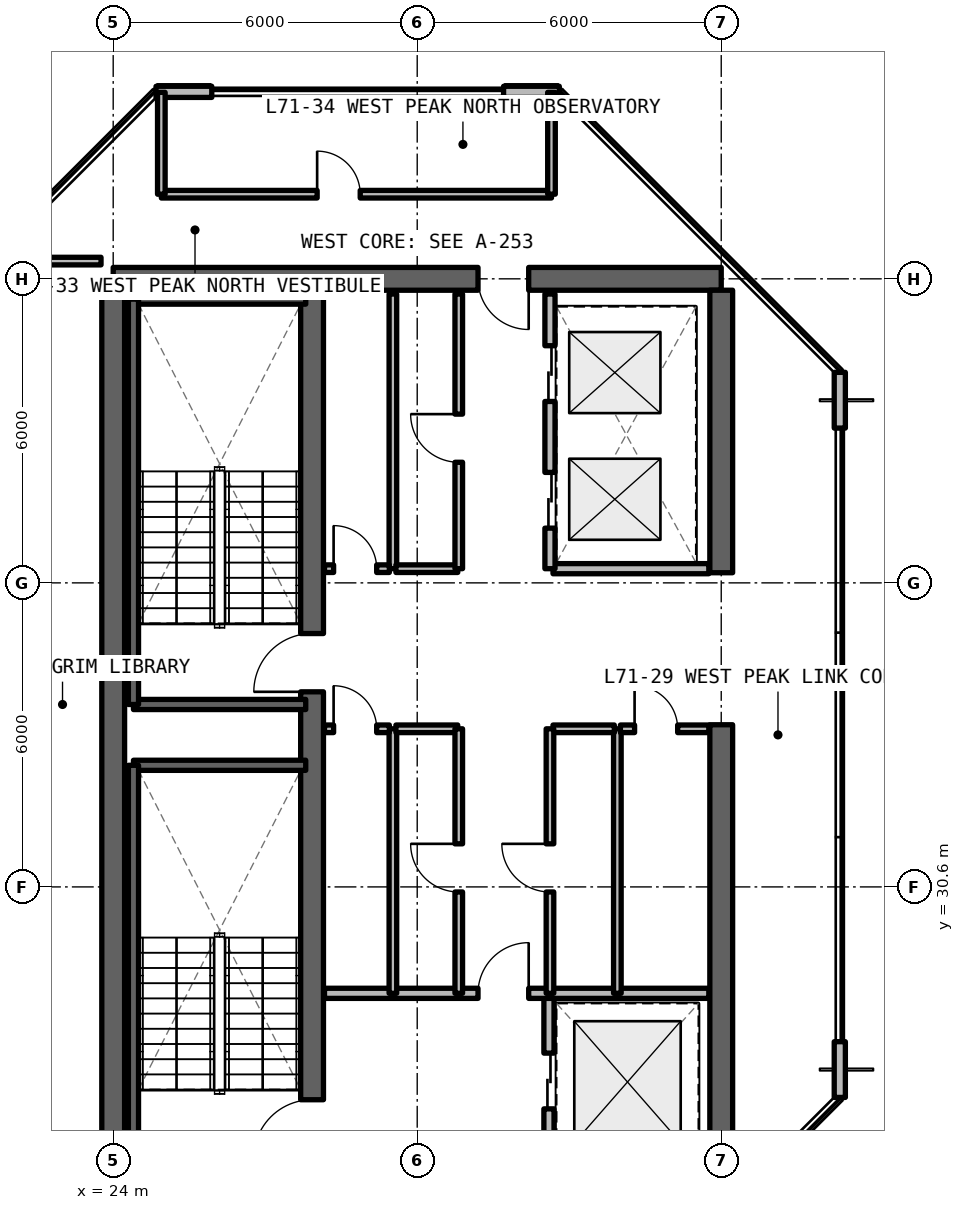
"""IFC4 building model, lengths in metres.
Left out: names, types, materials, properties, quantities, classifications, styles, units other than length and angle.
Written with IfcOpenShell. Run it as: python <this file> out.ifc"""

import sys

from ifc_helpers import new_model, si_unit, direction, frame, frame_2d, origin, place, context, subcontext, project, spatial, rectangle, extrude, element, fill, save


model = new_model("IFC4")
c1 = context("Model", 3, precision=1e-05, world=origin(), true_north=direction((0.0, 1.0)))
c2 = subcontext(c1, "Body", "Model", "MODEL_VIEW")
j1 = project(units=[si_unit("LENGTHUNIT", "METRE"), si_unit("PLANEANGLEUNIT", "RADIAN")], contexts=[c1])
p1 = place(None, origin())
s1 = spatial("IfcSite", under=j1, at=p1, CompositionType="ELEMENT")
p2 = place(p1, origin())
s2 = spatial("IfcBuilding", under=s1, at=p2, CompositionType="ELEMENT")
p3 = place(p2, frame((0.0, 0.0, 253.44)))
s3 = spatial("IfcBuildingStorey", under=s2, at=p3, CompositionType="ELEMENT", Elevation=253.44)
p4 = place(p3, frame((36.0, 42.6, 0.0), z_axis=(0.0, 0.0, 1.0), x_axis=(-1.0, 0.0, 0.0)))
e1 = element("IfcWall", 1, at=p4, inside=s3, PredefinedType="SHEAR", context=c2, shape_type="SweptSolid", body=[
    extrude(rectangle(XDim=12.0, YDim=0.45, at=frame_2d((6.0, 0.0))), origin(), (0.0, 0.0, 1.0), 3.63),
])
p5 = place(p4, frame((3.8, 0.0, 0.0)))
e2 = element("IfcOpeningElement", 2, at=p5, cuts=e1, PredefinedType="OPENING", context=c2, shape_type="SweptSolid", body=[
    extrude(rectangle(XDim=1.0, YDim=2.15, at=frame_2d((0.5, 1.075))), frame((0.0, 0.235, 0.0), z_axis=(0.0, -1.0, 0.0), x_axis=(1.0, 0.0, 0.0)), (0.0, 0.0, 1.0), 0.47),
])
p6 = place(p3, frame((24.0, 24.825, 0.0), z_axis=(0.0, 0.0, 1.0), x_axis=(0.0, 1.0, 0.0)))
e3 = element("IfcWall", 3, at=p6, inside=s3, PredefinedType="SHEAR", context=c2, shape_type="SweptSolid", body=[
    extrude(rectangle(XDim=17.55, YDim=0.45, at=frame_2d((8.775, 0.0))), origin(), (0.0, 0.0, 1.0), 3.63),
])
p7 = place(p3, frame((36.0, 24.825, 0.0), z_axis=(0.0, 0.0, 1.0), x_axis=(0.0, 1.0, 0.0)))
e4 = element("IfcWall", 4, at=p7, inside=s3, PredefinedType="SHEAR", context=c2, shape_type="SweptSolid", body=[
    extrude(rectangle(XDim=8.975, YDim=0.45, at=frame_2d((4.488, 0.0))), origin(), (0.0, 0.0, 1.0), 3.63),
])
p8 = place(p3, frame((36.0, 36.8, 0.0), z_axis=(0.0, 0.0, 1.0), x_axis=(0.0, 1.0, 0.0)))
e5 = element("IfcWall", 5, at=p8, inside=s3, PredefinedType="SHEAR", context=c2, shape_type="SweptSolid", body=[
    extrude(rectangle(XDim=5.575, YDim=0.45, at=frame_2d((2.788, 0.0))), origin(), (0.0, 0.0, 1.0), 3.63),
])
p9 = place(p3, frame((27.925, 24.825, 0.0), z_axis=(0.0, 0.0, 1.0), x_axis=(0.0, 1.0, 0.0)))
e6 = element("IfcWall", 6, at=p9, inside=s3, PredefinedType="SHEAR", context=c2, shape_type="SweptSolid", body=[
    extrude(rectangle(XDim=17.55, YDim=0.45, at=frame_2d((8.775, 0.0))), origin(), (0.0, 0.0, 1.0), 3.63),
])
p10 = place(p9, frame((0.425, 0.0, 0.0)))
e7 = element("IfcOpeningElement", 7, at=p10, cuts=e6, PredefinedType="OPENING", context=c2, shape_type="SweptSolid", body=[
    extrude(rectangle(XDim=1.15, YDim=2.15, at=frame_2d((0.575, 1.075))), frame((0.0, 0.235, 0.0), z_axis=(0.0, -1.0, 0.0), x_axis=(1.0, 0.0, 0.0)), (0.0, 0.0, 1.0), 0.47),
])
p11 = place(p9, frame((9.625, 0.0, 0.0)))
e8 = element("IfcOpeningElement", 8, at=p11, cuts=e6, PredefinedType="OPENING", context=c2, shape_type="SweptSolid", body=[
    extrude(rectangle(XDim=1.15, YDim=2.15, at=frame_2d((0.575, 1.075))), frame((0.0, 0.235, 0.0), z_axis=(0.0, -1.0, 0.0), x_axis=(1.0, 0.0, 0.0)), (0.0, 0.0, 1.0), 0.47),
])
for number, where, z_axis, x_axis in (
    (9, (38.34, 26.446, 0.0), (0.0, 0.0, 1.0), (0.0, 1.0, 0.0)),
    (10, (38.34, 39.654, 0.0), (0.0, 0.0, 1.0), (0.0, 1.0, 0.0)),
    (11, (32.804, 46.29, 0.0), (0.0, 0.0, 1.0), (-1.0, 0.0, 0.0)),
):
    element("IfcWall", number, at=place(p3, frame(where, z_axis=z_axis, x_axis=x_axis)), inside=s3, PredefinedType="SOLIDWALL", context=c2, shape_type="SweptSolid", body=[
        extrude(rectangle(XDim=1.1, YDim=0.22, at=frame_2d((0.55, 0.0))), origin(), (0.0, 0.0, 1.0), 3.41),
    ])
p12 = place(p3, frame((25.946, 46.29, 0.0), z_axis=(0.0, 0.0, 1.0), x_axis=(-1.0, 0.0, 0.0)))
e12 = element("IfcWall", 12, at=p12, inside=s3, PredefinedType="SOLIDWALL", context=c2, shape_type="SweptSolid", body=[
    extrude(rectangle(XDim=1.1, YDim=0.22, at=frame_2d((0.55, 0.0))), origin(), (0.0, 0.0, 1.0), 3.41),
])
p13 = place(p3, frame((32.6, 24.92, 0.0), z_axis=(0.0, 0.0, 1.0), x_axis=(0.0, 1.0, 0.0)))
e13 = element("IfcWall", 13, at=p13, inside=s3, PredefinedType="SOLIDWALL", context=c2, shape_type="SweptSolid", body=[
    extrude(rectangle(XDim=3.58, YDim=0.2, at=frame_2d((1.79, 0.0))), origin(), (0.0, 0.0, 1.0), 2.63),
])
p14 = place(p13, frame((1.3, 0.0, 0.0)))
e14 = element("IfcOpeningElement", 14, at=p14, cuts=e13, PredefinedType="OPENING", context=c2, shape_type="SweptSolid", body=[
    extrude(rectangle(XDim=1.1, YDim=2.2, at=frame_2d((0.55, 1.1))), frame((0.0, 0.11, 0.0), z_axis=(0.0, -1.0, 0.0), x_axis=(1.0, 0.0, 0.0)), (0.0, 0.0, 1.0), 0.22),
])
p15 = place(p3, frame((28.17, 28.5, 0.0), z_axis=(0.0, 0.0, 1.0), x_axis=(1.0, 0.0, 0.0)))
e15 = element("IfcWall", 15, at=p15, inside=s3, PredefinedType="SOLIDWALL", context=c2, shape_type="SweptSolid", body=[
    extrude(rectangle(XDim=7.585, YDim=0.2, at=frame_2d((3.792, 0.0))), origin(), (0.0, 0.0, 1.0), 2.63),
])
p16 = place(p15, frame((3.03, 0.0, 0.0)))
e16 = element("IfcOpeningElement", 16, at=p16, cuts=e15, PredefinedType="OPENING", context=c2, shape_type="SweptSolid", body=[
    extrude(rectangle(XDim=1.0, YDim=2.15, at=frame_2d((0.5, 1.075))), frame((0.0, 0.11, 0.0), z_axis=(0.0, -1.0, 0.0), x_axis=(1.0, 0.0, 0.0)), (0.0, 0.0, 1.0), 0.22),
])
p17 = place(p3, frame((29.52, 28.5, 0.0), z_axis=(0.0, 0.0, 1.0), x_axis=(0.0, 1.0, 0.0)))
e17 = element("IfcWall", 17, at=p17, inside=s3, PredefinedType="SOLIDWALL", context=c2, shape_type="SweptSolid", body=[
    extrude(rectangle(XDim=5.22, YDim=0.15, at=frame_2d((2.61, 0.0))), origin(), (0.0, 0.0, 1.0), 2.63),
])
p18 = place(p3, frame((28.17, 33.72, 0.0), z_axis=(0.0, 0.0, 1.0), x_axis=(1.0, 0.0, 0.0)))
e18 = element("IfcWall", 18, at=p18, inside=s3, PredefinedType="SOLIDWALL", context=c2, shape_type="SweptSolid", body=[
    extrude(rectangle(XDim=1.28, YDim=0.15, at=frame_2d((0.64, 0.0))), origin(), (0.0, 0.0, 1.0), 2.63),
])
p19 = place(p18, frame((0.18, 0.0, 0.0)))
e19 = element("IfcOpeningElement", 19, at=p19, cuts=e18, PredefinedType="OPENING", context=c2, shape_type="SweptSolid", body=[
    extrude(rectangle(XDim=0.85, YDim=2.1, at=frame_2d((0.425, 1.05))), frame((0.0, 0.085, 0.0), z_axis=(0.0, -1.0, 0.0), x_axis=(1.0, 0.0, 0.0)), (0.0, 0.0, 1.0), 0.17),
])
p20 = place(p3, frame((29.58, 33.72, 0.0), z_axis=(0.0, 0.0, 1.0), x_axis=(1.0, 0.0, 0.0)))
e20 = element("IfcWall", 20, at=p20, inside=s3, PredefinedType="SOLIDWALL", context=c2, shape_type="SweptSolid", body=[
    extrude(rectangle(XDim=1.22, YDim=0.15, at=frame_2d((0.61, 0.0))), origin(), (0.0, 0.0, 1.0), 2.63),
])
p21 = place(p3, frame((30.82, 28.5, 0.0), z_axis=(0.0, 0.0, 1.0), x_axis=(0.0, 1.0, 0.0)))
e21 = element("IfcWall", 21, at=p21, inside=s3, PredefinedType="SOLIDWALL", context=c2, shape_type="SweptSolid", body=[
    extrude(rectangle(XDim=5.22, YDim=0.15, at=frame_2d((2.61, 0.0))), origin(), (0.0, 0.0, 1.0), 2.63),
])
p22 = place(p21, frame((2.0, 0.0, 0.0)))
e22 = element("IfcOpeningElement", 22, at=p22, cuts=e21, PredefinedType="OPENING", context=c2, shape_type="SweptSolid", body=[
    extrude(rectangle(XDim=0.95, YDim=2.15, at=frame_2d((0.475, 1.075))), frame((0.0, 0.085, 0.0), z_axis=(0.0, -1.0, 0.0), x_axis=(1.0, 0.0, 0.0)), (0.0, 0.0, 1.0), 0.17),
])
p23 = place(p3, frame((33.95, 28.5, 0.0), z_axis=(0.0, 0.0, 1.0), x_axis=(0.0, 1.0, 0.0)))
e23 = element("IfcWall", 23, at=p23, inside=s3, PredefinedType="SOLIDWALL", context=c2, shape_type="SweptSolid", body=[
    extrude(rectangle(XDim=5.22, YDim=0.15, at=frame_2d((2.61, 0.0))), origin(), (0.0, 0.0, 1.0), 2.63),
])
p24 = place(p3, frame((32.68, 33.72, 0.0), z_axis=(0.0, 0.0, 1.0), x_axis=(1.0, 0.0, 0.0)))
e24 = element("IfcWall", 24, at=p24, inside=s3, PredefinedType="SOLIDWALL", context=c2, shape_type="SweptSolid", body=[
    extrude(rectangle(XDim=1.21, YDim=0.15, at=frame_2d((0.605, 0.0))), origin(), (0.0, 0.0, 1.0), 2.63),
])
p25 = place(p3, frame((34.01, 33.72, 0.0), z_axis=(0.0, 0.0, 1.0), x_axis=(1.0, 0.0, 0.0)))
e25 = element("IfcWall", 25, at=p25, inside=s3, PredefinedType="SOLIDWALL", context=c2, shape_type="SweptSolid", body=[
    extrude(rectangle(XDim=1.745, YDim=0.15, at=frame_2d((0.873, 0.0))), origin(), (0.0, 0.0, 1.0), 2.63),
])
p26 = place(p25, frame((0.28, 0.0, 0.0)))
e26 = element("IfcOpeningElement", 26, at=p26, cuts=e25, PredefinedType="OPENING", context=c2, shape_type="SweptSolid", body=[
    extrude(rectangle(XDim=0.85, YDim=2.1, at=frame_2d((0.425, 1.05))), frame((0.0, 0.085, 0.0), z_axis=(0.0, -1.0, 0.0), x_axis=(1.0, 0.0, 0.0)), (0.0, 0.0, 1.0), 0.17),
])
p27 = place(p3, frame((32.62, 28.5, 0.0), z_axis=(0.0, 0.0, 1.0), x_axis=(0.0, 1.0, 0.0)))
e27 = element("IfcWall", 27, at=p27, inside=s3, PredefinedType="SOLIDWALL", context=c2, shape_type="SweptSolid", body=[
    extrude(rectangle(XDim=5.22, YDim=0.15, at=frame_2d((2.61, 0.0))), origin(), (0.0, 0.0, 1.0), 2.63),
])
p28 = place(p27, frame((2.0, 0.0, 0.0)))
e28 = element("IfcOpeningElement", 28, at=p28, cuts=e27, PredefinedType="OPENING", context=c2, shape_type="SweptSolid", body=[
    extrude(rectangle(XDim=0.95, YDim=2.15, at=frame_2d((0.475, 1.075))), frame((0.0, 0.085, 0.0), z_axis=(0.0, -1.0, 0.0), x_axis=(1.0, 0.0, 0.0)), (0.0, 0.0, 1.0), 0.17),
])
p29 = place(p3, frame((29.52, 36.88, 0.0), z_axis=(0.0, 0.0, 1.0), x_axis=(0.0, 1.0, 0.0)))
e29 = element("IfcWall", 29, at=p29, inside=s3, PredefinedType="SOLIDWALL", context=c2, shape_type="SweptSolid", body=[
    extrude(rectangle(XDim=5.42, YDim=0.15, at=frame_2d((2.71, 0.0))), origin(), (0.0, 0.0, 1.0), 2.63),
])
p30 = place(p3, frame((28.17, 36.88, 0.0), z_axis=(0.0, 0.0, 1.0), x_axis=(1.0, 0.0, 0.0)))
e30 = element("IfcWall", 30, at=p30, inside=s3, PredefinedType="SOLIDWALL", context=c2, shape_type="SweptSolid", body=[
    extrude(rectangle(XDim=1.28, YDim=0.15, at=frame_2d((0.64, 0.0))), origin(), (0.0, 0.0, 1.0), 2.63),
])
p31 = place(p30, frame((0.18, 0.0, 0.0)))
e31 = element("IfcOpeningElement", 31, at=p31, cuts=e30, PredefinedType="OPENING", context=c2, shape_type="SweptSolid", body=[
    extrude(rectangle(XDim=0.85, YDim=2.1, at=frame_2d((0.425, 1.05))), frame((0.0, 0.085, 0.0), z_axis=(0.0, -1.0, 0.0), x_axis=(1.0, 0.0, 0.0)), (0.0, 0.0, 1.0), 0.17),
])
p32 = place(p3, frame((29.58, 36.88, 0.0), z_axis=(0.0, 0.0, 1.0), x_axis=(1.0, 0.0, 0.0)))
e32 = element("IfcWall", 32, at=p32, inside=s3, PredefinedType="SOLIDWALL", context=c2, shape_type="SweptSolid", body=[
    extrude(rectangle(XDim=1.22, YDim=0.15, at=frame_2d((0.61, 0.0))), origin(), (0.0, 0.0, 1.0), 2.63),
])
p33 = place(p3, frame((30.82, 36.88, 0.0), z_axis=(0.0, 0.0, 1.0), x_axis=(0.0, 1.0, 0.0)))
e33 = element("IfcWall", 33, at=p33, inside=s3, PredefinedType="SOLIDWALL", context=c2, shape_type="SweptSolid", body=[
    extrude(rectangle(XDim=5.42, YDim=0.15, at=frame_2d((2.71, 0.0))), origin(), (0.0, 0.0, 1.0), 2.63),
])
p34 = place(p33, frame((2.1, 0.0, 0.0)))
e34 = element("IfcOpeningElement", 34, at=p34, cuts=e33, PredefinedType="OPENING", context=c2, shape_type="SweptSolid", body=[
    extrude(rectangle(XDim=0.95, YDim=2.15, at=frame_2d((0.475, 1.075))), frame((0.0, 0.085, 0.0), z_axis=(0.0, -1.0, 0.0), x_axis=(1.0, 0.0, 0.0)), (0.0, 0.0, 1.0), 0.17),
])
p35 = place(p3, frame((32.68, 36.88, 0.0), z_axis=(0.0, 0.0, 1.0), x_axis=(1.0, 0.0, 0.0)))
e35 = element("IfcWall", 35, at=p35, inside=s3, PredefinedType="SOLIDWALL", context=c2, shape_type="SweptSolid", body=[
    extrude(rectangle(XDim=3.075, YDim=0.2, at=frame_2d((1.538, 0.0))), origin(), (0.0, 0.0, 1.0), 2.63),
])
p36 = place(p3, frame((32.62, 36.88, 0.0), z_axis=(0.0, 0.0, 1.0), x_axis=(0.0, 1.0, 0.0)))
e36 = element("IfcWall", 36, at=p36, inside=s3, PredefinedType="SOLIDWALL", context=c2, shape_type="SweptSolid", body=[
    extrude(rectangle(XDim=5.42, YDim=0.2, at=frame_2d((2.71, 0.0))), origin(), (0.0, 0.0, 1.0), 2.63),
])
p37 = place(p36, frame((0.8, 0.0, 0.0)))
e37 = element("IfcOpeningElement", 37, at=p37, cuts=e36, PredefinedType="OPENING", context=c2, shape_type="SweptSolid", body=[
    extrude(rectangle(XDim=1.1, YDim=2.2, at=frame_2d((0.55, 1.1))), frame((0.0, 0.11, 0.0), z_axis=(0.0, -1.0, 0.0), x_axis=(1.0, 0.0, 0.0)), (0.0, 0.0, 1.0), 0.22),
])
p38 = place(p36, frame((3.3, 0.0, 0.0)))
e38 = element("IfcOpeningElement", 38, at=p38, cuts=e36, PredefinedType="OPENING", context=c2, shape_type="SweptSolid", body=[
    extrude(rectangle(XDim=1.1, YDim=2.2, at=frame_2d((0.55, 1.1))), frame((0.0, 0.11, 0.0), z_axis=(0.0, -1.0, 0.0), x_axis=(1.0, 0.0, 0.0)), (0.0, 0.0, 1.0), 0.22),
])
p39 = place(p3, frame((22.12, 42.95, 0.0), z_axis=(0.0, 0.0, 1.0), x_axis=(1.0, 0.0, 0.0)))
e39 = element("IfcWall", 39, at=p39, inside=s3, PredefinedType="SOLIDWALL", context=c2, shape_type="SweptSolid", body=[
    extrude(rectangle(XDim=1.64, YDim=0.15, at=frame_2d((0.82, 0.0))), origin(), (0.0, 0.0, 1.0), 2.63),
])
p40 = place(p3, frame((24.95, 44.27, 0.0), z_axis=(0.0, 0.0, 1.0), x_axis=(1.0, 0.0, 0.0)))
e40 = element("IfcWall", 40, at=p40, inside=s3, PredefinedType="SOLIDWALL", context=c2, shape_type="SweptSolid", body=[
    extrude(rectangle(XDim=7.7, YDim=0.15, at=frame_2d((3.85, 0.0))), origin(), (0.0, 0.0, 1.0), 2.63),
])
p41 = place(p40, frame((3.075, 0.0, 0.0)))
e41 = element("IfcOpeningElement", 41, at=p41, cuts=e40, PredefinedType="OPENING", context=c2, shape_type="SweptSolid", body=[
    extrude(rectangle(XDim=0.85, YDim=2.1, at=frame_2d((0.425, 1.05))), frame((0.0, 0.085, 0.0), z_axis=(0.0, -1.0, 0.0), x_axis=(1.0, 0.0, 0.0)), (0.0, 0.0, 1.0), 0.17),
])
for number, where, z_axis, x_axis in (
    (42, (24.95, 44.27, 0.0), (0.0, 0.0, 1.0), (0.0, 1.0, 0.0)),
    (43, (32.65, 44.27, 0.0), (0.0, 0.0, 1.0), (0.0, 1.0, 0.0)),
):
    element("IfcWall", number, at=place(p3, frame(where, z_axis=z_axis, x_axis=x_axis)), inside=s3, PredefinedType="SOLIDWALL", context=c2, shape_type="SweptSolid", body=[
        extrude(rectangle(XDim=2.01, YDim=0.15, at=frame_2d((1.005, 0.0))), origin(), (0.0, 0.0, 1.0), 2.63),
    ])
p42 = place(p3, frame((27.8, 33.0, 0.0), z_axis=(0.0, 0.0, 1.0), x_axis=(-1.0, 0.0, 0.0)))
e44 = element("IfcWall", 44, at=p42, inside=s3, PredefinedType="SOLIDWALL", context=c2, shape_type="SweptSolid", body=[
    extrude(rectangle(XDim=3.4, YDim=0.2, at=frame_2d((1.7, 0.0))), origin(), (0.0, 0.0, 1.0), 3.63),
])
p43 = place(p3, frame((24.4, 33.0, 0.0), z_axis=(0.0, 0.0, 1.0), x_axis=(0.0, -1.0, 0.0)))
e45 = element("IfcWall", 45, at=p43, inside=s3, PredefinedType="SOLIDWALL", context=c2, shape_type="SweptSolid", body=[
    extrude(rectangle(XDim=8.0, YDim=0.2, at=frame_2d((4.0, 0.0))), origin(), (0.0, 0.0, 1.0), 3.63),
])
for number, where, z_axis, x_axis in (
    (46, (24.4, 34.2, 0.0), (0.0, 0.0, 1.0), (1.0, 0.0, 0.0)),
    (47, (27.8, 42.2, 0.0), (0.0, 0.0, 1.0), (-1.0, 0.0, 0.0)),
):
    element("IfcWall", number, at=place(p3, frame(where, z_axis=z_axis, x_axis=x_axis)), inside=s3, PredefinedType="SOLIDWALL", context=c2, shape_type="SweptSolid", body=[
        extrude(rectangle(XDim=3.4, YDim=0.2, at=frame_2d((1.7, 0.0))), origin(), (0.0, 0.0, 1.0), 3.63),
    ])
p44 = place(p3, frame((24.4, 42.2, 0.0), z_axis=(0.0, 0.0, 1.0), x_axis=(0.0, -1.0, 0.0)))
e48 = element("IfcWall", 48, at=p44, inside=s3, PredefinedType="SOLIDWALL", context=c2, shape_type="SweptSolid", body=[
    extrude(rectangle(XDim=8.0, YDim=0.2, at=frame_2d((4.0, 0.0))), origin(), (0.0, 0.0, 1.0), 3.63),
])
p45 = place(p14, origin())
e49 = element("IfcDoor", 49, at=p45, inside=s3, OperationType="SLIDING_TO_LEFT", PredefinedType="DOOR", context=c2, shape_type="SweptSolid", body=[
    extrude(rectangle(XDim=1.1, YDim=2.2, at=frame_2d((0.55, 1.1))), frame((0.0, 0.025, 0.0), z_axis=(0.0, -1.0, 0.0), x_axis=(1.0, 0.0, 0.0)), (0.0, 0.0, 1.0), 0.05),
])
fill(e14, e49)
p46 = place(p16, origin())
e50 = element("IfcDoor", 50, at=p46, inside=s3, OperationType="SINGLE_SWING_RIGHT", PredefinedType="DOOR", context=c2, shape_type="SweptSolid", body=[
    extrude(rectangle(XDim=1.0, YDim=2.15, at=frame_2d((0.5, 1.075))), frame((0.0, 0.025, 0.0), z_axis=(0.0, -1.0, 0.0), x_axis=(1.0, 0.0, 0.0)), (0.0, 0.0, 1.0), 0.05),
])
fill(e16, e50)
p47 = place(p19, origin())
e51 = element("IfcDoor", 51, at=p47, inside=s3, OperationType="SINGLE_SWING_LEFT", PredefinedType="DOOR", context=c2, shape_type="SweptSolid", body=[
    extrude(rectangle(XDim=0.85, YDim=2.1, at=frame_2d((0.425, 1.05))), frame((0.0, 0.025, 0.0), z_axis=(0.0, -1.0, 0.0), x_axis=(1.0, 0.0, 0.0)), (0.0, 0.0, 1.0), 0.05),
])
fill(e19, e51)
p48 = place(p22, origin())
e52 = element("IfcDoor", 52, at=p48, inside=s3, OperationType="SINGLE_SWING_RIGHT", PredefinedType="DOOR", context=c2, shape_type="SweptSolid", body=[
    extrude(rectangle(XDim=0.95, YDim=2.15, at=frame_2d((0.475, 1.075))), frame((0.0, 0.025, 0.0), z_axis=(0.0, -1.0, 0.0), x_axis=(1.0, 0.0, 0.0)), (0.0, 0.0, 1.0), 0.05),
])
fill(e22, e52)
p49 = place(p26, origin())
e53 = element("IfcDoor", 53, at=p49, inside=s3, OperationType="SINGLE_SWING_LEFT", PredefinedType="DOOR", context=c2, shape_type="SweptSolid", body=[
    extrude(rectangle(XDim=0.85, YDim=2.1, at=frame_2d((0.425, 1.05))), frame((0.0, 0.025, 0.0), z_axis=(0.0, -1.0, 0.0), x_axis=(1.0, 0.0, 0.0)), (0.0, 0.0, 1.0), 0.05),
])
fill(e26, e53)
p50 = place(p28, origin())
e54 = element("IfcDoor", 54, at=p50, inside=s3, OperationType="SINGLE_SWING_RIGHT", PredefinedType="DOOR", context=c2, shape_type="SweptSolid", body=[
    extrude(rectangle(XDim=0.95, YDim=2.15, at=frame_2d((0.475, 1.075))), frame((0.0, 0.025, 0.0), z_axis=(0.0, -1.0, 0.0), x_axis=(1.0, 0.0, 0.0)), (0.0, 0.0, 1.0), 0.05),
])
fill(e28, e54)
p51 = place(p31, origin())
e55 = element("IfcDoor", 55, at=p51, inside=s3, OperationType="SINGLE_SWING_LEFT", PredefinedType="DOOR", context=c2, shape_type="SweptSolid", body=[
    extrude(rectangle(XDim=0.85, YDim=2.1, at=frame_2d((0.425, 1.05))), frame((0.0, 0.025, 0.0), z_axis=(0.0, -1.0, 0.0), x_axis=(1.0, 0.0, 0.0)), (0.0, 0.0, 1.0), 0.05),
])
fill(e31, e55)
p52 = place(p34, origin())
e56 = element("IfcDoor", 56, at=p52, inside=s3, OperationType="SINGLE_SWING_RIGHT", PredefinedType="DOOR", context=c2, shape_type="SweptSolid", body=[
    extrude(rectangle(XDim=0.95, YDim=2.15, at=frame_2d((0.475, 1.075))), frame((0.0, 0.025, 0.0), z_axis=(0.0, -1.0, 0.0), x_axis=(1.0, 0.0, 0.0)), (0.0, 0.0, 1.0), 0.05),
])
fill(e34, e56)
p53 = place(p37, origin())
e57 = element("IfcDoor", 57, at=p53, inside=s3, OperationType="SLIDING_TO_LEFT", PredefinedType="DOOR", context=c2, shape_type="SweptSolid", body=[
    extrude(rectangle(XDim=1.1, YDim=2.2, at=frame_2d((0.55, 1.1))), frame((0.0, 0.025, 0.0), z_axis=(0.0, -1.0, 0.0), x_axis=(1.0, 0.0, 0.0)), (0.0, 0.0, 1.0), 0.05),
])
fill(e37, e57)
p54 = place(p38, origin())
e58 = element("IfcDoor", 58, at=p54, inside=s3, OperationType="SLIDING_TO_RIGHT", PredefinedType="DOOR", context=c2, shape_type="SweptSolid", body=[
    extrude(rectangle(XDim=1.1, YDim=2.2, at=frame_2d((0.55, 1.1))), frame((0.0, 0.025, 0.0), z_axis=(0.0, -1.0, 0.0), x_axis=(1.0, 0.0, 0.0)), (0.0, 0.0, 1.0), 0.05),
])
fill(e38, e58)
p55 = place(p41, origin())
e59 = element("IfcDoor", 59, at=p55, inside=s3, OperationType="SINGLE_SWING_LEFT", PredefinedType="DOOR", context=c2, shape_type="SweptSolid", body=[
    extrude(rectangle(XDim=0.85, YDim=2.1, at=frame_2d((0.425, 1.05))), frame((0.0, 0.025, 0.0), z_axis=(0.0, -1.0, 0.0), x_axis=(1.0, 0.0, 0.0)), (0.0, 0.0, 1.0), 0.05),
])
fill(e41, e59)
p56 = place(p10, origin())
e60 = element("IfcDoor", 60, at=p56, inside=s3, OperationType="SINGLE_SWING_RIGHT", PredefinedType="DOOR", context=c2, shape_type="SweptSolid", body=[
    extrude(rectangle(XDim=1.15, YDim=2.15, at=frame_2d((0.575, 1.075))), frame((0.0, 0.025, 0.0), z_axis=(0.0, -1.0, 0.0), x_axis=(1.0, 0.0, 0.0)), (0.0, 0.0, 1.0), 0.05),
])
fill(e7, e60)
p57 = place(p11, origin())
e61 = element("IfcDoor", 61, at=p57, inside=s3, OperationType="SINGLE_SWING_LEFT", PredefinedType="DOOR", context=c2, shape_type="SweptSolid", body=[
    extrude(rectangle(XDim=1.15, YDim=2.15, at=frame_2d((0.575, 1.075))), frame((0.0, 0.025, 0.0), z_axis=(0.0, -1.0, 0.0), x_axis=(1.0, 0.0, 0.0)), (0.0, 0.0, 1.0), 0.05),
])
fill(e8, e61)
p58 = place(p5, origin())
e62 = element("IfcDoor", 62, at=p58, inside=s3, OperationType="SINGLE_SWING_RIGHT", PredefinedType="DOOR", context=c2, shape_type="SweptSolid", body=[
    extrude(rectangle(XDim=1.0, YDim=2.15, at=frame_2d((0.5, 1.075))), frame((0.0, 0.025, 0.0), z_axis=(0.0, -1.0, 0.0), x_axis=(1.0, 0.0, 0.0)), (0.0, 0.0, 1.0), 0.05),
])
fill(e2, e62)
save(model, sys.argv[1])
